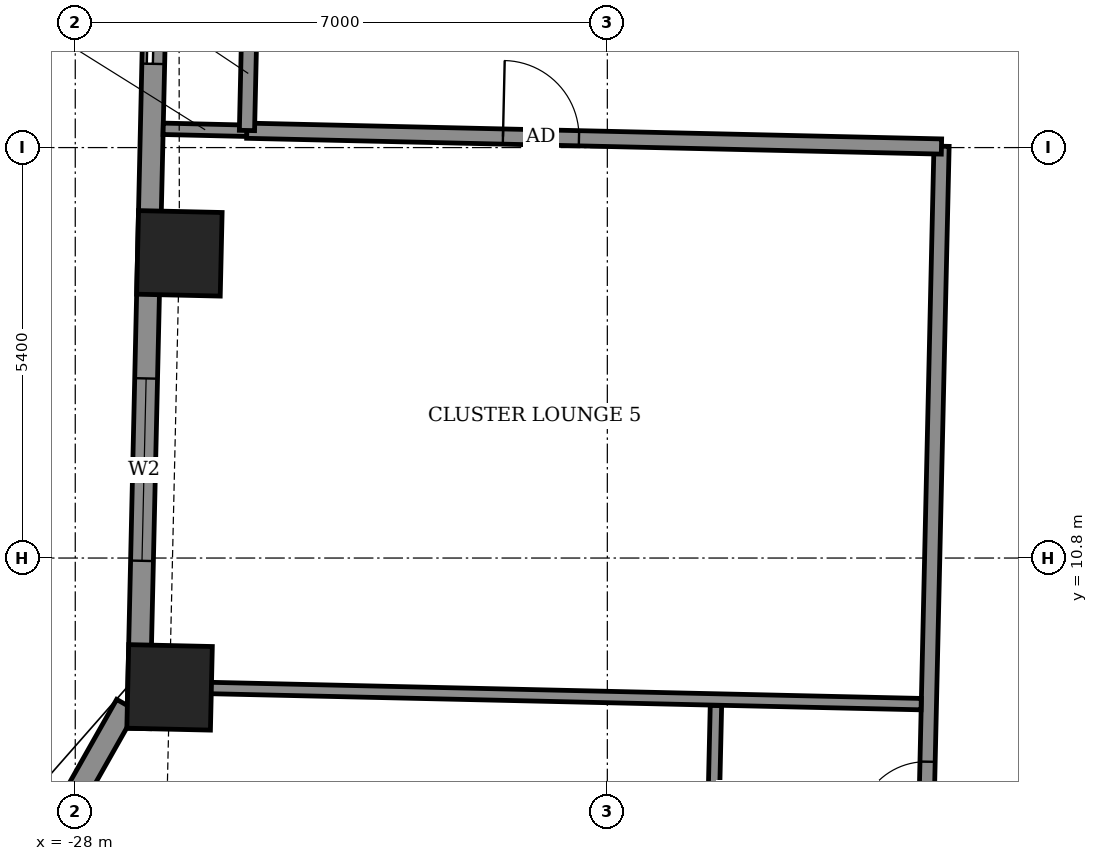
"""IFC4 building model, lengths in metres.
Left out: names, types, materials, properties, quantities, classifications, styles, units other than length and angle.
Written with IfcOpenShell. Run it as: python <this file> out.ifc"""

import sys

from ifc_helpers import new_model, si_unit, direction, frame, frame_2d, origin, origin_2d, place, context, subcontext, project, spatial, rectangle, extrude, element, fill, save


model = new_model("IFC4")
c1 = context("Model", 3, precision=1e-05, world=origin(), true_north=direction((0.0, 1.0)))
c2 = subcontext(c1, "Body", "Model", "MODEL_VIEW")
j1 = project(units=[si_unit("LENGTHUNIT", "METRE"), si_unit("PLANEANGLEUNIT", "RADIAN")], contexts=[c1])
p1 = place(None, origin())
s1 = spatial("IfcSite", under=j1, at=p1, CompositionType="ELEMENT")
p2 = place(p1, origin())
s2 = spatial("IfcBuilding", under=s1, at=p2, CompositionType="ELEMENT")
p3 = place(p2, frame((0.0, 0.0, 208.7)))
s3 = spatial("IfcBuildingStorey", under=s2, at=p3, CompositionType="ELEMENT", Elevation=208.7)
for number, where, z_axis, x_axis in (
    (1, (-26.63, 14.809, -0.55), (0.0, 0.0, 1.0), (-0.023, -1.0, 0.0)),
    (2, (-26.759, 9.099, -0.55), (0.0, 0.0, 1.0), (-0.023, -1.0, 0.0)),
):
    element("IfcColumn", number, at=place(p3, frame(where, z_axis=z_axis, x_axis=x_axis)), inside=s3, PredefinedType="COLUMN", context=c2, shape_type="SweptSolid", body=[
        extrude(rectangle(XDim=1.1, YDim=1.1, at=origin_2d()), origin(), (0.0, 0.0, 1.0), 3.6),
    ])
p4 = place(p3, frame((-26.904, 20.379, 0.0), z_axis=(0.0, 0.0, 1.0), x_axis=(-0.022671687694, -0.999742964255, 0.0)))
e3 = element("IfcWall", 3, at=p4, inside=s3, PredefinedType="SOLIDWALL", context=c2, shape_type="SweptSolid", body=[
    extrude(rectangle(XDim=11.824, YDim=0.3, at=frame_2d((5.912, 0.0))), origin(), (0.0, 0.0, 1.0), 2.55),
])
p5 = place(p4, frame((1.578, 0.0, 0.0)))
e4 = element("IfcOpeningElement", 4, at=p5, cuts=e3, PredefinedType="OPENING", context=c2, shape_type="SweptSolid", body=[
    extrude(rectangle(XDim=1.5, YDim=2.4, at=frame_2d((0.75, 1.2))), frame((0.0, 0.16, 0.0), z_axis=(0.0, -1.0, 0.0), x_axis=(1.0, 0.0, 0.0)), (0.0, 0.0, 1.0), 0.32),
])
p6 = place(p4, frame((7.218, 0.0, 0.9)))
e5 = element("IfcOpeningElement", 5, at=p6, cuts=e3, PredefinedType="OPENING", context=c2, shape_type="SweptSolid", body=[
    extrude(rectangle(XDim=2.4, YDim=1.5, at=frame_2d((1.2, 0.75))), frame((0.0, 0.16, 0.0), z_axis=(0.0, -1.0, 0.0), x_axis=(1.0, 0.0, 0.0)), (0.0, 0.0, 1.0), 0.32),
])
p7 = place(p3, frame((-27.325, 8.866, 0.0), z_axis=(0.0, 0.0, 1.0), x_axis=(-0.492554919955, -0.870281363025, 0.0)))
e6 = element("IfcWall", 6, at=p7, inside=s3, PredefinedType="SOLIDWALL", context=c2, shape_type="SweptSolid", body=[
    extrude(rectangle(XDim=5.398, YDim=0.3, at=frame_2d((2.699, 0.0))), origin(), (0.0, 0.0, 1.0), 3.05),
])
p8 = place(p7, frame((2.008, 0.0, 0.9)))
e7 = element("IfcOpeningElement", 7, at=p8, cuts=e6, PredefinedType="OPENING", context=c2, shape_type="SweptSolid", body=[
    extrude(rectangle(XDim=1.2, YDim=1.5, at=frame_2d((0.6, 0.75))), frame((0.0, 0.16, 0.0), z_axis=(0.0, -1.0, 0.0), x_axis=(1.0, 0.0, 0.0)), (0.0, 0.0, 1.0), 0.32),
])
p9 = place(p3, frame((-17.247, -12.149, 0.0), z_axis=(0.0, 0.0, 1.0), x_axis=(0.022698146637, 0.999742363881, 0.0)))
e8 = element("IfcWall", 8, at=p9, inside=s3, PredefinedType="PARTITIONING", context=c2, shape_type="SweptSolid", body=[
    extrude(rectangle(XDim=28.374, YDim=0.2, at=frame_2d((14.187, 0.0))), origin(), (0.0, 0.0, 1.0), 3.05),
])
p10 = place(p9, frame((17.225, 0.0, 0.0)))
e9 = element("IfcOpeningElement", 9, at=p10, cuts=e8, PredefinedType="OPENING", context=c2, shape_type="SweptSolid", body=[
    extrude(rectangle(XDim=1.0, YDim=2.1, at=frame_2d((0.5, 1.05))), frame((0.0, 0.11, 0.0), z_axis=(0.0, -1.0, 0.0), x_axis=(1.0, 0.0, 0.0)), (0.0, 0.0, 1.0), 0.22),
])
p11 = place(p9, frame((19.375, 0.0, 0.0)))
e10 = element("IfcOpeningElement", 10, at=p11, cuts=e8, PredefinedType="OPENING", context=c2, shape_type="SweptSolid", body=[
    extrude(rectangle(XDim=0.9, YDim=2.1, at=frame_2d((0.45, 1.05))), frame((0.0, 0.11, 0.0), z_axis=(0.0, -1.0, 0.0), x_axis=(1.0, 0.0, 0.0)), (0.0, 0.0, 1.0), 0.22),
])
p12 = place(p9, frame((13.822, 0.0, 0.0)))
e11 = element("IfcOpeningElement", 11, at=p12, cuts=e8, PredefinedType="OPENING", context=c2, shape_type="SweptSolid", body=[
    extrude(rectangle(XDim=1.0, YDim=2.1, at=frame_2d((0.5, 1.05))), frame((0.0, 0.11, 0.0), z_axis=(0.0, -1.0, 0.0), x_axis=(1.0, 0.0, 0.0)), (0.0, 0.0, 1.0), 0.22),
])
p13 = place(p9, frame((10.25, 0.0, 0.0)))
e12 = element("IfcOpeningElement", 12, at=p13, cuts=e8, PredefinedType="OPENING", context=c2, shape_type="SweptSolid", body=[
    extrude(rectangle(XDim=1.0, YDim=2.1, at=frame_2d((0.5, 1.05))), frame((0.0, 0.11, 0.0), z_axis=(0.0, -1.0, 0.0), x_axis=(1.0, 0.0, 0.0)), (0.0, 0.0, 1.0), 0.22),
])
p14 = place(p9, frame((8.025, 0.0, 0.0)))
e13 = element("IfcOpeningElement", 13, at=p14, cuts=e8, PredefinedType="OPENING", context=c2, shape_type="SweptSolid", body=[
    extrude(rectangle(XDim=0.9, YDim=2.1, at=frame_2d((0.45, 1.05))), frame((0.0, 0.11, 0.0), z_axis=(0.0, -1.0, 0.0), x_axis=(1.0, 0.0, 0.0)), (0.0, 0.0, 1.0), 0.22),
])
p15 = place(p9, frame((5.262, 0.0, 0.0)))
e14 = element("IfcOpeningElement", 14, at=p15, cuts=e8, PredefinedType="OPENING", context=c2, shape_type="SweptSolid", body=[
    extrude(rectangle(XDim=1.0, YDim=2.1, at=frame_2d((0.5, 1.05))), frame((0.0, 0.11, 0.0), z_axis=(0.0, -1.0, 0.0), x_axis=(1.0, 0.0, 0.0)), (0.0, 0.0, 1.0), 0.22),
])
p16 = place(p9, frame((2.825, 0.0, 0.0)))
e15 = element("IfcOpeningElement", 15, at=p16, cuts=e8, PredefinedType="OPENING", context=c2, shape_type="SweptSolid", body=[
    extrude(rectangle(XDim=1.0, YDim=2.1, at=frame_2d((0.5, 1.05))), frame((0.0, 0.11, 0.0), z_axis=(0.0, -1.0, 0.0), x_axis=(1.0, 0.0, 0.0)), (0.0, 0.0, 1.0), 0.22),
])
p17 = place(p9, frame((0.75, 0.0, 0.0)))
e16 = element("IfcOpeningElement", 16, at=p17, cuts=e8, PredefinedType="OPENING", context=c2, shape_type="SweptSolid", body=[
    extrude(rectangle(XDim=0.9, YDim=2.1, at=frame_2d((0.45, 1.05))), frame((0.0, 0.11, 0.0), z_axis=(0.0, -1.0, 0.0), x_axis=(1.0, 0.0, 0.0)), (0.0, 0.0, 1.0), 0.22),
])
p18 = place(p3, frame((-19.624, 6.535, 0.0), z_axis=(0.0, 0.0, 1.0), x_axis=(0.022778632478, 0.99974053329, 0.0)))
e17 = element("IfcWall", 17, at=p18, inside=s3, PredefinedType="PARTITIONING", context=c2, shape_type="SweptSolid", body=[
    extrude(rectangle(XDim=2.326, YDim=0.15, at=frame_2d((1.163, 0.0))), origin(), (0.0, 0.0, 1.0), 3.05),
])
p19 = place(p3, frame((-27.01, 9.108, 0.0), z_axis=(0.0, 0.0, 1.0), x_axis=(0.999742841246, -0.022677111331, 0.0)))
e18 = element("IfcWall", 18, at=p19, inside=s3, PredefinedType="PARTITIONING", context=c2, shape_type="SweptSolid", body=[
    extrude(rectangle(XDim=10.142, YDim=0.15, at=frame_2d((5.071, 0.0))), origin(), (0.0, 0.0, 1.0), 3.05),
])
p20 = place(p3, frame((-26.843, 16.447, 0.0), z_axis=(0.0, 0.0, 1.0), x_axis=(0.999720170098, -0.023655475055, 0.0)))
e19 = element("IfcWall", 19, at=p20, inside=s3, PredefinedType="PARTITIONING", context=c2, shape_type="SweptSolid", body=[
    extrude(rectangle(XDim=1.104, YDim=0.15, at=frame_2d((0.552, 0.0))), origin(), (0.0, 0.0, 1.0), 2.55),
])
p21 = place(p3, frame((-25.743, 16.422, 0.0), z_axis=(0.0, 0.0, 1.0), x_axis=(0.999741076645, -0.022754772455, 0.0)))
e20 = element("IfcWall", 20, at=p21, inside=s3, PredefinedType="PARTITIONING", context=c2, shape_type="SweptSolid", body=[
    extrude(rectangle(XDim=9.141, YDim=0.2, at=frame_2d((4.571, 0.0))), origin(), (0.0, 0.0, 1.0), 3.05),
])
p22 = place(p21, frame((3.371, 0.0, 0.0)))
e21 = element("IfcOpeningElement", 21, at=p22, cuts=e20, PredefinedType="OPENING", context=c2, shape_type="SweptSolid", body=[
    extrude(rectangle(XDim=1.0, YDim=2.1, at=frame_2d((0.5, 1.05))), frame((0.0, 0.11, 0.0), z_axis=(0.0, -1.0, 0.0), x_axis=(1.0, 0.0, 0.0)), (0.0, 0.0, 1.0), 0.22),
])
p23 = place(p3, frame((-25.741, 16.425, 0.0), z_axis=(0.0, 0.0, 1.0), x_axis=(0.022617910375, 0.999744182344, 0.0)))
e22 = element("IfcWall", 22, at=p23, inside=s3, PredefinedType="PARTITIONING", context=c2, shape_type="SweptSolid", body=[
    extrude(rectangle(XDim=1.5, YDim=0.2, at=frame_2d((0.75, 0.0))), origin(), (0.0, 0.0, 1.0), 3.05),
])
p24 = place(p5, origin())
e23 = element("IfcDoor", 23, at=p24, inside=s3, OperationType="SLIDING_TO_LEFT", PredefinedType="DOOR", context=c2, shape_type="SweptSolid", body=[
    extrude(rectangle(XDim=1.5, YDim=2.4, at=frame_2d((0.75, 1.2))), frame((0.0, 0.025, 0.0), z_axis=(0.0, -1.0, 0.0), x_axis=(1.0, 0.0, 0.0)), (0.0, 0.0, 1.0), 0.05),
])
fill(e4, e23)
p25 = place(p6, origin())
e24 = element("IfcWindow", 24, at=p25, inside=s3, PartitioningType="DOUBLE_PANEL_VERTICAL", PredefinedType="WINDOW", context=c2, shape_type="SweptSolid", body=[
    extrude(rectangle(XDim=2.4, YDim=1.5, at=frame_2d((1.2, 0.75))), frame((0.0, 0.03, 0.0), z_axis=(0.0, -1.0, 0.0), x_axis=(1.0, 0.0, 0.0)), (0.0, 0.0, 1.0), 0.06),
])
fill(e5, e24)
p26 = place(p22, origin())
e25 = element("IfcDoor", 25, at=p26, inside=s3, OperationType="SINGLE_SWING_LEFT", PredefinedType="DOOR", context=c2, shape_type="SweptSolid", body=[
    extrude(rectangle(XDim=1.0, YDim=2.1, at=frame_2d((0.5, 1.05))), frame((0.0, 0.025, 0.0), z_axis=(0.0, -1.0, 0.0), x_axis=(1.0, 0.0, 0.0)), (0.0, 0.0, 1.0), 0.05),
])
fill(e21, e25)
p27 = place(p11, origin())
e26 = element("IfcDoor", 26, at=p27, inside=s3, OperationType="SINGLE_SWING_RIGHT", PredefinedType="DOOR", context=c2, shape_type="SweptSolid", body=[
    extrude(rectangle(XDim=0.9, YDim=2.1, at=frame_2d((0.45, 1.05))), frame((0.0, 0.025, 0.0), z_axis=(0.0, -1.0, 0.0), x_axis=(1.0, 0.0, 0.0)), (0.0, 0.0, 1.0), 0.05),
])
fill(e10, e26)
save(model, sys.argv[1])
